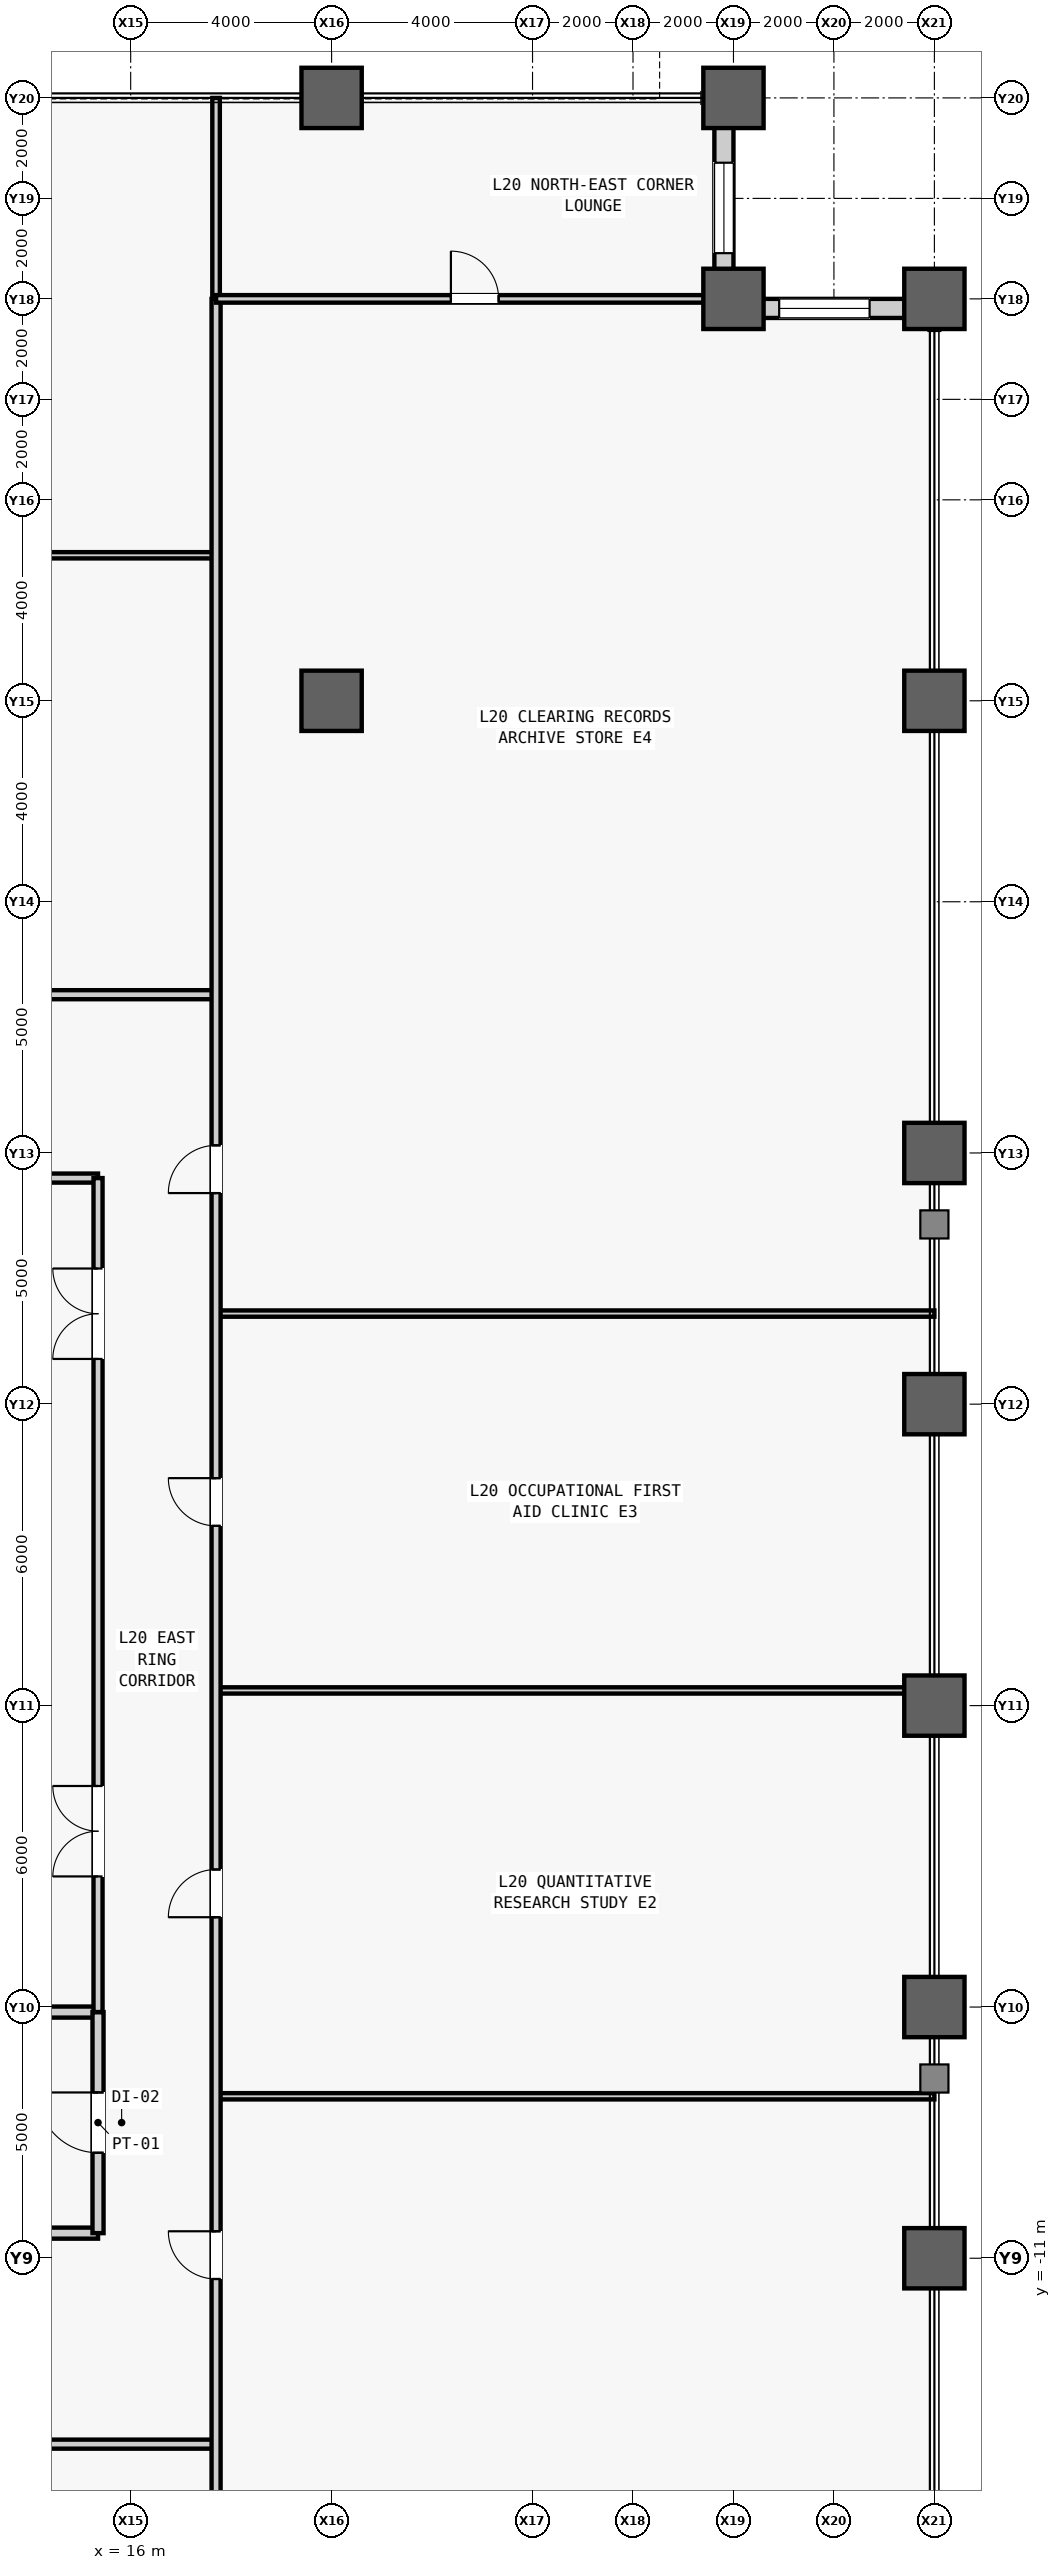
"""IFC4 building model, lengths in metres.
Left out: names, types, materials, properties, quantities, classifications, styles, units other than length and angle.
Written with IfcOpenShell. Run it as: python <this file> out.ifc"""

import sys

from ifc_helpers import new_model, si_unit, direction, frame, frame_2d, origin, origin_2d, place, context, subcontext, project, spatial, rectangle, hollow_rectangle, extrude, source, transform, mapped, element, fill, save


model = new_model("IFC4")
c1 = context("Model", 3, precision=1e-05, world=origin(), true_north=direction((0.0, 1.0)))
c2 = subcontext(c1, "Body", "Model", "MODEL_VIEW")
j1 = project(units=[si_unit("LENGTHUNIT", "METRE"), si_unit("PLANEANGLEUNIT", "RADIAN")], contexts=[c1])
p1 = place(None, origin())
s1 = spatial("IfcSite", under=j1, at=p1, CompositionType="ELEMENT")
p2 = place(p1, origin())
s2 = spatial("IfcBuilding", under=s1, at=p2, CompositionType="ELEMENT")
p3 = place(p2, frame((0.0, 0.0, 91.4)))
s3 = spatial("IfcBuildingStorey", under=s2, at=p3, CompositionType="ELEMENT", Elevation=91.4)
m1 = source(origin(), c2, "Body", "SweptSolid", [
    extrude(hollow_rectangle(XDim=1.2, YDim=1.2, WallThickness=0.07, at=origin_2d()), origin(), (0.0, 0.0, 1.0), 4.1),
])
for number, where, z_axis, x_axis in (
    (1, (20.0, 20.0, 0.0), (0.0, 0.0, 1.0), (1.0, 0.0, 0.0)),
    (2, (20.0, 32.0, 0.0), (0.0, 0.0, 1.0), (1.0, 0.0, 0.0)),
    (3, (28.0, 28.0, 0.0), (0.0, 0.0, 1.0), (1.0, 0.0, 0.0)),
    (4, (28.0, 32.0, 0.0), (0.0, 0.0, 1.0), (1.0, 0.0, 0.0)),
    (5, (32.0, -11.0, 0.0), (0.0, 0.0, 1.0), (1.0, 0.0, 0.0)),
    (6, (32.0, -6.0, 0.0), (0.0, 0.0, 1.0), (1.0, 0.0, 0.0)),
    (7, (32.0, 0.0, 0.0), (0.0, 0.0, 1.0), (1.0, 0.0, 0.0)),
    (8, (32.0, 6.0, 0.0), (0.0, 0.0, 1.0), (1.0, 0.0, 0.0)),
    (9, (32.0, 11.0, 0.0), (0.0, 0.0, 1.0), (1.0, 0.0, 0.0)),
    (10, (32.0, 20.0, 0.0), (0.0, 0.0, 1.0), (1.0, 0.0, 0.0)),
    (11, (32.0, 28.0, 0.0), (0.0, 0.0, 1.0), (1.0, 0.0, 0.0)),
):
    element("IfcColumn", number, at=place(p3, frame(where, z_axis=z_axis, x_axis=x_axis)), inside=s3, PredefinedType="COLUMN", context=c2, shape_type="MappedRepresentation", body=[
        mapped(m1, transform((0.0, 0.0, 0.0), scale=1.0)),
    ])
m2 = source(origin(), c2, "Body", "SweptSolid", [
    extrude(rectangle(XDim=3.62, YDim=0.38, at=frame_2d((1.81, 0.0))), origin(), (0.0, 0.0, 1.0), 3.145),
])
p4 = place(p3, frame((28.0, 27.81, 0.0), z_axis=(0.0, 0.0, 1.0), x_axis=(1.0, 0.0, 0.0)))
e12 = element("IfcWall", 12, at=p4, inside=s3, PredefinedType="STANDARD", context=c2, shape_type="MappedRepresentation", body=[
    mapped(m2, transform((0.0, 0.0, 0.0), scale=1.0)),
])
m3 = source(origin(), c2, "Body", "SweptSolid", [
    extrude(rectangle(XDim=1.8, YDim=2.4, at=frame_2d((0.9, 1.2))), frame((0.0, 0.2, 0.0), z_axis=(0.0, -1.0, 0.0), x_axis=(1.0, 0.0, 0.0)), (0.0, 0.0, 1.0), 0.4),
])
p5 = place(p4, frame((0.91, 0.0, 0.5)))
e13 = element("IfcOpeningElement", 13, at=p5, cuts=e12, PredefinedType="OPENING", context=c2, shape_type="MappedRepresentation", body=[
    mapped(m3, transform((0.0, 0.0, 0.0), scale=1.0)),
])
p6 = place(p3, frame((27.81, 28.0, 0.0), z_axis=(0.0, 0.0, 1.0), x_axis=(0.0, 1.0, 0.0)))
e14 = element("IfcWall", 14, at=p6, inside=s3, PredefinedType="STANDARD", context=c2, shape_type="MappedRepresentation", body=[
    mapped(m2, transform((0.0, 0.0, 0.0), scale=1.0)),
])
p7 = place(p6, frame((0.91, 0.0, 0.5)))
e15 = element("IfcOpeningElement", 15, at=p7, cuts=e14, PredefinedType="OPENING", context=c2, shape_type="MappedRepresentation", body=[
    mapped(m3, transform((0.0, 0.0, 0.0), scale=1.0)),
])
m4 = source(origin(), c2, "Body", "SweptSolid", [
    extrude(rectangle(XDim=4.05, YDim=0.22, at=frame_2d((2.025, 0.0))), origin(), (0.0, 0.0, 1.0), 3.84),
])
p8 = place(p3, frame((11.3, -10.5, 0.0), z_axis=(0.0, 0.0, 1.0), x_axis=(1.0, 0.0, 0.0)))
e16 = element("IfcWall", 16, at=p8, inside=s3, PredefinedType="PARTITIONING", context=c2, shape_type="MappedRepresentation", body=[
    mapped(m4, transform((0.0, 0.0, 0.0), scale=1.0)),
])
m5 = source(origin(), c2, "Body", "SweptSolid", [
    extrude(rectangle(XDim=4.05, YDim=0.22, at=frame_2d((2.025, 0.0))), origin(), (0.0, 0.0, 1.0), 3.067),
])
p9 = place(p3, frame((11.3, -6.1, 0.0), z_axis=(0.0, 0.0, 1.0), x_axis=(1.0, 0.0, 0.0)))
e17 = element("IfcWall", 17, at=p9, inside=s3, PredefinedType="PARTITIONING", context=c2, shape_type="MappedRepresentation", body=[
    mapped(m5, transform((0.0, 0.0, 0.0), scale=1.0)),
])
m6 = source(origin(), c2, "Body", "SweptSolid", [
    extrude(rectangle(XDim=4.4, YDim=0.22, at=frame_2d((2.2, 0.0))), origin(), (0.0, 0.0, 1.0), 3.84),
])
p10 = place(p3, frame((15.35, -10.5, 0.0), z_axis=(0.0, 0.0, 1.0), x_axis=(0.0, 1.0, 0.0)))
e18 = element("IfcWall", 18, at=p10, inside=s3, PredefinedType="PARTITIONING", context=c2, shape_type="MappedRepresentation", body=[
    mapped(m6, transform((0.0, 0.0, 0.0), scale=1.0)),
])
m7 = source(origin(), c2, "Body", "SweptSolid", [
    extrude(rectangle(XDim=1.2, YDim=2.2, at=frame_2d((0.6, 1.1))), frame((0.0, 0.12, 0.0), z_axis=(0.0, -1.0, 0.0), x_axis=(1.0, 0.0, 0.0)), (0.0, 0.0, 1.0), 0.24),
])
p11 = place(p10, frame((1.6, 0.0, 0.0)))
e19 = element("IfcOpeningElement", 19, at=p11, cuts=e18, PredefinedType="OPENING", context=c2, shape_type="MappedRepresentation", body=[
    mapped(m7, transform((0.0, 0.0, 0.0), scale=1.0)),
])
m8 = source(origin(), c2, "Body", "SweptSolid", [
    extrude(rectangle(XDim=4.05, YDim=0.18, at=frame_2d((2.025, 0.0))), origin(), (0.0, 0.0, 1.0), 3.84),
])
p12 = place(p3, frame((11.3, 10.5, 0.0), z_axis=(0.0, 0.0, 1.0), x_axis=(1.0, 0.0, 0.0)))
e20 = element("IfcWall", 20, at=p12, inside=s3, PredefinedType="PARTITIONING", context=c2, shape_type="MappedRepresentation", body=[
    mapped(m8, transform((0.0, 0.0, 0.0), scale=1.0)),
])
m9 = source(origin(), c2, "Body", "SweptSolid", [
    extrude(rectangle(XDim=16.6, YDim=0.18, at=frame_2d((8.3, 0.0))), origin(), (0.0, 0.0, 1.0), 3.84),
])
p13 = place(p3, frame((15.35, -6.1, 0.0), z_axis=(0.0, 0.0, 1.0), x_axis=(0.0, 1.0, 0.0)))
e21 = element("IfcWall", 21, at=p13, inside=s3, PredefinedType="PARTITIONING", context=c2, shape_type="MappedRepresentation", body=[
    mapped(m9, transform((0.0, 0.0, 0.0), scale=1.0)),
])
m10 = source(origin(), c2, "Body", "SweptSolid", [
    extrude(rectangle(XDim=1.8, YDim=2.25, at=frame_2d((0.9, 1.125))), frame((0.0, 0.1, 0.0), z_axis=(0.0, -1.0, 0.0), x_axis=(1.0, 0.0, 0.0)), (0.0, 0.0, 1.0), 0.2),
])
p14 = place(p13, frame((2.7, 0.0, 0.0)))
e22 = element("IfcOpeningElement", 22, at=p14, cuts=e21, PredefinedType="OPENING", context=c2, shape_type="MappedRepresentation", body=[
    mapped(m10, transform((0.0, 0.0, 0.0), scale=1.0)),
])
p15 = place(p13, frame((13.0, 0.0, 0.0)))
e23 = element("IfcOpeningElement", 23, at=p15, cuts=e21, PredefinedType="OPENING", context=c2, shape_type="MappedRepresentation", body=[
    mapped(m10, transform((0.0, 0.0, 0.0), scale=1.0)),
])
m11 = source(origin(), c2, "Body", "SweptSolid", [
    extrude(rectangle(XDim=37.1, YDim=0.18, at=frame_2d((18.55, 0.0))), origin(), (0.0, 0.0, 1.0), 3.84),
])
p16 = place(p3, frame((-19.4, -14.7, 0.0), z_axis=(0.0, 0.0, 1.0), x_axis=(1.0, 0.0, 0.0)))
e24 = element("IfcWall", 24, at=p16, inside=s3, PredefinedType="PARTITIONING", context=c2, shape_type="MappedRepresentation", body=[
    mapped(m11, transform((0.0, 0.0, 0.0), scale=1.0)),
])
m12 = source(origin(), c2, "Body", "SweptSolid", [
    extrude(rectangle(XDim=1.05, YDim=2.2, at=frame_2d((0.525, 1.1))), frame((0.0, 0.1, 0.0), z_axis=(0.0, -1.0, 0.0), x_axis=(1.0, 0.0, 0.0)), (0.0, 0.0, 1.0), 0.2),
])
p17 = place(p16, frame((18.875, 0.0, 0.0)))
e25 = element("IfcOpeningElement", 25, at=p17, cuts=e24, PredefinedType="OPENING", context=c2, shape_type="MappedRepresentation", body=[
    mapped(m12, transform((0.0, 0.0, 0.0), scale=1.0)),
])
m13 = source(origin(), c2, "Body", "SweptSolid", [
    extrude(rectangle(XDim=37.1, YDim=0.125, at=frame_2d((18.55, 0.0))), origin(), (0.0, 0.0, 1.0), 3.84),
])
p18 = place(p3, frame((-19.4, 22.896, 0.0), z_axis=(0.0, 0.0, 1.0), x_axis=(1.0, 0.0, 0.0)))
e26 = element("IfcWall", 26, at=p18, inside=s3, PredefinedType="PARTITIONING", context=c2, shape_type="MappedRepresentation", body=[
    mapped(m13, transform((0.0, 0.0, 0.0), scale=1.0)),
])
m14 = source(origin(), c2, "Body", "SweptSolid", [
    extrude(rectangle(XDim=0.95, YDim=2.15, at=frame_2d((0.475, 1.075))), frame((0.0, 0.073, 0.0), z_axis=(0.0, -1.0, 0.0), x_axis=(1.0, 0.0, 0.0)), (0.0, 0.0, 1.0), 0.145),
])
p19 = place(p18, frame((18.075, 0.0, 0.0)))
e27 = element("IfcOpeningElement", 27, at=p19, cuts=e26, PredefinedType="OPENING", context=c2, shape_type="MappedRepresentation", body=[
    mapped(m14, transform((0.0, 0.0, 0.0), scale=1.0)),
])
p20 = place(p3, frame((-19.4, 14.15, 0.0), z_axis=(0.0, 0.0, 1.0), x_axis=(1.0, 0.0, 0.0)))
e28 = element("IfcWall", 28, at=p20, inside=s3, PredefinedType="PARTITIONING", context=c2, shape_type="MappedRepresentation", body=[
    mapped(m11, transform((0.0, 0.0, 0.0), scale=1.0)),
])
p21 = place(p20, frame((18.875, 0.0, 0.0)))
e29 = element("IfcOpeningElement", 29, at=p21, cuts=e28, PredefinedType="OPENING", context=c2, shape_type="MappedRepresentation", body=[
    mapped(m12, transform((0.0, 0.0, 0.0), scale=1.0)),
])
m15 = source(origin(), c2, "Body", "SweptSolid", [
    extrude(rectangle(XDim=4.0, YDim=0.15, at=frame_2d((2.0, 0.0))), origin(), (0.0, 0.0, 1.0), 3.84),
])
p22 = place(p3, frame((17.7, 28.0, 0.0), z_axis=(0.0, 0.0, 1.0), x_axis=(0.0, 1.0, 0.0)))
e30 = element("IfcWall", 30, at=p22, inside=s3, PredefinedType="PARTITIONING", context=c2, shape_type="MappedRepresentation", body=[
    mapped(m15, transform((0.0, 0.0, 0.0), scale=1.0)),
])
m16 = source(origin(), c2, "Body", "SweptSolid", [
    extrude(rectangle(XDim=14.3, YDim=0.125, at=frame_2d((7.15, 0.0))), origin(), (0.0, 0.0, 1.0), 3.84),
])
p23 = place(p3, frame((17.7, -7.776, 0.0), z_axis=(0.0, 0.0, 1.0), x_axis=(1.0, 0.0, 0.0)))
e31 = element("IfcWall", 31, at=p23, inside=s3, PredefinedType="PARTITIONING", context=c2, shape_type="MappedRepresentation", body=[
    mapped(m16, transform((0.0, 0.0, 0.0), scale=1.0)),
])
m17 = source(origin(), c2, "Body", "SweptSolid", [
    extrude(rectangle(XDim=14.3, YDim=0.125, at=frame_2d((7.15, 0.0))), origin(), (0.0, 0.0, 1.0), 3.067),
])
p24 = place(p3, frame((17.7, 0.302, 0.0), z_axis=(0.0, 0.0, 1.0), x_axis=(1.0, 0.0, 0.0)))
e32 = element("IfcWall", 32, at=p24, inside=s3, PredefinedType="PARTITIONING", context=c2, shape_type="MappedRepresentation", body=[
    mapped(m17, transform((0.0, 0.0, 0.0), scale=1.0)),
])
p25 = place(p3, frame((17.7, 7.803, 0.0), z_axis=(0.0, 0.0, 1.0), x_axis=(1.0, 0.0, 0.0)))
e33 = element("IfcWall", 33, at=p25, inside=s3, PredefinedType="PARTITIONING", context=c2, shape_type="MappedRepresentation", body=[
    mapped(m16, transform((0.0, 0.0, 0.0), scale=1.0)),
])
m18 = source(origin(), c2, "Body", "SweptSolid", [
    extrude(rectangle(XDim=56.0, YDim=0.18, at=frame_2d((28.0, 0.0))), origin(), (0.0, 0.0, 1.0), 3.84),
])
p26 = place(p3, frame((17.7, -28.0, 0.0), z_axis=(0.0, 0.0, 1.0), x_axis=(0.0, 1.0, 0.0)))
e34 = element("IfcWall", 34, at=p26, inside=s3, PredefinedType="PARTITIONING", context=c2, shape_type="MappedRepresentation", body=[
    mapped(m18, transform((0.0, 0.0, 0.0), scale=1.0)),
])
m19 = source(origin(), c2, "Body", "SweptSolid", [
    extrude(rectangle(XDim=0.95, YDim=2.15, at=frame_2d((0.475, 1.075))), frame((0.0, 0.1, 0.0), z_axis=(0.0, -1.0, 0.0), x_axis=(1.0, 0.0, 0.0)), (0.0, 0.0, 1.0), 0.2),
])
p27 = place(p26, frame((16.587, 0.0, 0.0)))
e35 = element("IfcOpeningElement", 35, at=p27, cuts=e34, PredefinedType="OPENING", context=c2, shape_type="MappedRepresentation", body=[
    mapped(m19, transform((0.0, 0.0, 0.0), scale=1.0)),
])
p28 = place(p26, frame((23.788, 0.0, 0.0)))
e36 = element("IfcOpeningElement", 36, at=p28, cuts=e34, PredefinedType="OPENING", context=c2, shape_type="MappedRepresentation", body=[
    mapped(m19, transform((0.0, 0.0, 0.0), scale=1.0)),
])
p29 = place(p26, frame((31.577, 0.0, 0.0)))
e37 = element("IfcOpeningElement", 37, at=p29, cuts=e34, PredefinedType="OPENING", context=c2, shape_type="MappedRepresentation", body=[
    mapped(m19, transform((0.0, 0.0, 0.0), scale=1.0)),
])
p30 = place(p26, frame((38.201, 0.0, 0.0)))
e38 = element("IfcOpeningElement", 38, at=p30, cuts=e34, PredefinedType="OPENING", context=c2, shape_type="MappedRepresentation", body=[
    mapped(m19, transform((0.0, 0.0, 0.0), scale=1.0)),
])
m20 = source(origin(), c2, "Body", "SweptSolid", [
    extrude(rectangle(XDim=10.3, YDim=0.15, at=frame_2d((5.15, 0.0))), origin(), (0.0, 0.0, 1.0), 3.84),
])
p31 = place(p3, frame((17.7, 28.0, 0.0), z_axis=(0.0, 0.0, 1.0), x_axis=(1.0, 0.0, 0.0)))
e39 = element("IfcWall", 39, at=p31, inside=s3, PredefinedType="PARTITIONING", context=c2, shape_type="MappedRepresentation", body=[
    mapped(m20, transform((0.0, 0.0, 0.0), scale=1.0)),
])
m21 = source(origin(), c2, "Body", "SweptSolid", [
    extrude(rectangle(XDim=0.95, YDim=2.15, at=frame_2d((0.475, 1.075))), frame((0.0, 0.085, 0.0), z_axis=(0.0, -1.0, 0.0), x_axis=(1.0, 0.0, 0.0)), (0.0, 0.0, 1.0), 0.17),
])
p32 = place(p31, frame((4.675, 0.0, 0.0)))
e40 = element("IfcOpeningElement", 40, at=p32, cuts=e39, PredefinedType="OPENING", context=c2, shape_type="MappedRepresentation", body=[
    mapped(m21, transform((0.0, 0.0, 0.0), scale=1.0)),
])
m22 = source(origin(), c2, "Body", "SweptSolid", [
    extrude(rectangle(XDim=1.8, YDim=2.4, at=frame_2d((0.9, 1.2))), frame((0.0, 0.03, 0.0), z_axis=(0.0, -1.0, 0.0), x_axis=(1.0, 0.0, 0.0)), (0.0, 0.0, 1.0), 0.06),
])
p33 = place(p5, origin())
e41 = element("IfcWindow", 41, at=p33, inside=s3, PartitioningType="SINGLE_PANEL", PredefinedType="WINDOW", context=c2, shape_type="MappedRepresentation", body=[
    mapped(m22, transform((0.0, 0.0, 0.0), scale=1.0)),
])
fill(e13, e41)
p34 = place(p7, origin())
e42 = element("IfcWindow", 42, at=p34, inside=s3, PartitioningType="SINGLE_PANEL", PredefinedType="WINDOW", context=c2, shape_type="MappedRepresentation", body=[
    mapped(m22, transform((0.0, 0.0, 0.0), scale=1.0)),
])
fill(e15, e42)
m23 = source(origin(), c2, "Body", "SweptSolid", [
    extrude(rectangle(XDim=1.2, YDim=2.2, at=frame_2d((0.6, 1.1))), frame((0.0, 0.025, 0.0), z_axis=(0.0, -1.0, 0.0), x_axis=(1.0, 0.0, 0.0)), (0.0, 0.0, 1.0), 0.05),
])
p35 = place(p11, origin())
e43 = element("IfcDoor", 43, at=p35, inside=s3, OperationType="SINGLE_SWING_RIGHT", PredefinedType="DOOR", context=c2, shape_type="MappedRepresentation", body=[
    mapped(m23, transform((0.0, 0.0, 0.0), scale=1.0)),
])
fill(e19, e43)
m24 = source(origin(), c2, "Body", "SweptSolid", [
    extrude(rectangle(XDim=1.8, YDim=2.25, at=frame_2d((0.9, 1.125))), frame((0.0, 0.025, 0.0), z_axis=(0.0, -1.0, 0.0), x_axis=(1.0, 0.0, 0.0)), (0.0, 0.0, 1.0), 0.05),
])
p36 = place(p14, origin())
e44 = element("IfcDoor", 44, at=p36, inside=s3, OperationType="SINGLE_SWING_RIGHT", PredefinedType="DOOR", context=c2, shape_type="MappedRepresentation", body=[
    mapped(m24, transform((0.0, 0.0, 0.0), scale=1.0)),
])
fill(e22, e44)
p37 = place(p15, origin())
e45 = element("IfcDoor", 45, at=p37, inside=s3, OperationType="SINGLE_SWING_LEFT", PredefinedType="DOOR", context=c2, shape_type="MappedRepresentation", body=[
    mapped(m24, transform((0.0, 0.0, 0.0), scale=1.0)),
])
fill(e23, e45)
m25 = source(origin(), c2, "Body", "SweptSolid", [
    extrude(rectangle(XDim=0.95, YDim=2.15, at=frame_2d((0.475, 1.075))), frame((0.0, 0.025, 0.0), z_axis=(0.0, -1.0, 0.0), x_axis=(1.0, 0.0, 0.0)), (0.0, 0.0, 1.0), 0.05),
])
p38 = place(p27, origin())
e46 = element("IfcDoor", 46, at=p38, inside=s3, OperationType="SINGLE_SWING_RIGHT", PredefinedType="DOOR", context=c2, shape_type="MappedRepresentation", body=[
    mapped(m25, transform((0.0, 0.0, 0.0), scale=1.0)),
])
fill(e35, e46)
p39 = place(p28, origin())
e47 = element("IfcDoor", 47, at=p39, inside=s3, OperationType="SINGLE_SWING_LEFT", PredefinedType="DOOR", context=c2, shape_type="MappedRepresentation", body=[
    mapped(m25, transform((0.0, 0.0, 0.0), scale=1.0)),
])
fill(e36, e47)
p40 = place(p29, origin())
e48 = element("IfcDoor", 48, at=p40, inside=s3, OperationType="SINGLE_SWING_RIGHT", PredefinedType="DOOR", context=c2, shape_type="MappedRepresentation", body=[
    mapped(m25, transform((0.0, 0.0, 0.0), scale=1.0)),
])
fill(e37, e48)
p41 = place(p30, origin())
e49 = element("IfcDoor", 49, at=p41, inside=s3, OperationType="SINGLE_SWING_LEFT", PredefinedType="DOOR", context=c2, shape_type="MappedRepresentation", body=[
    mapped(m25, transform((0.0, 0.0, 0.0), scale=1.0)),
])
fill(e38, e49)
p42 = place(p32, origin())
e50 = element("IfcDoor", 50, at=p42, inside=s3, OperationType="SINGLE_SWING_LEFT", PredefinedType="DOOR", context=c2, shape_type="MappedRepresentation", body=[
    mapped(m25, transform((0.0, 0.0, 0.0), scale=1.0)),
])
fill(e40, e50)
save(model, sys.argv[1])
